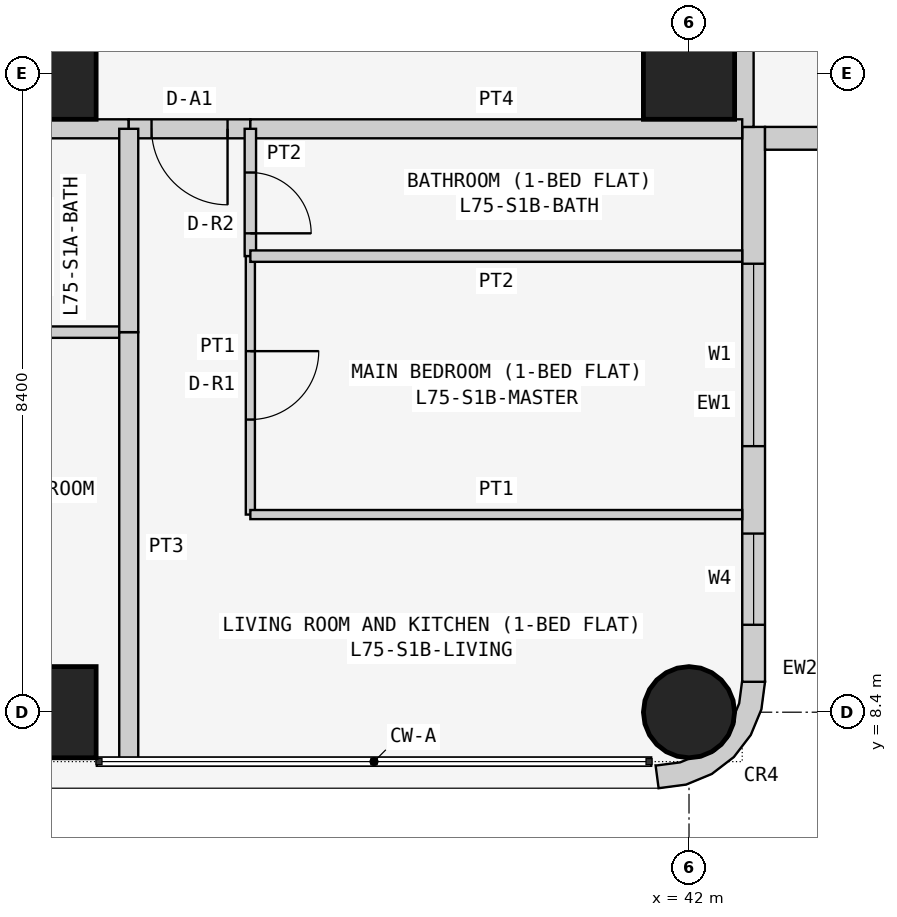
"""IFC4 building model, lengths in metres.
Left out: names, types, materials, properties, quantities, classifications, styles, units other than length and angle.
Written with IfcOpenShell. Run it as: python <this file> out.ifc"""

import sys

from ifc_helpers import new_model, si_unit, direction, frame, frame_2d, origin, origin_2d, place, context, subcontext, project, spatial, polyline, rectangle, circle, outline, extrude, element, fill, save


model = new_model("IFC4")
c1 = context("Model", 3, precision=1e-05, world=origin(), true_north=direction((0.0, 1.0)))
c2 = subcontext(c1, "Body", "Model", "MODEL_VIEW")
j1 = project(units=[si_unit("LENGTHUNIT", "METRE"), si_unit("PLANEANGLEUNIT", "RADIAN")], contexts=[c1])
p1 = place(None, origin())
s1 = spatial("IfcSite", under=j1, at=p1, CompositionType="ELEMENT")
p2 = place(p1, origin())
s2 = spatial("IfcBuilding", under=s1, at=p2, CompositionType="ELEMENT")
p3 = place(p2, frame((0.0, 0.0, 286.5)))
s3 = spatial("IfcBuildingStorey", under=s2, at=p3, CompositionType="ELEMENT", Elevation=286.5)
for number, where, z_axis, x_axis in (
    (1, (33.6, 8.4, 0.0), (0.0, 0.0, 1.0), (1.0, 0.0, 0.0)),
    (2, (33.6, 16.8, 0.0), (0.0, 0.0, 1.0), (1.0, 0.0, 0.0)),
):
    element("IfcColumn", number, at=place(p3, frame(where, z_axis=z_axis, x_axis=x_axis)), inside=s3, PredefinedType="COLUMN", context=c2, shape_type="SweptSolid", body=[
        extrude(rectangle(XDim=1.2, YDim=1.2, at=origin_2d()), origin(), (0.0, 0.0, 1.0), 3.6),
    ])
p4 = place(p3, frame((42.0, 8.4, 0.0), z_axis=(0.0, 0.0, 1.0), x_axis=(1.0, 0.0, 0.0)))
e3 = element("IfcColumn", 3, at=p4, inside=s3, PredefinedType="COLUMN", context=c2, shape_type="SweptSolid", body=[
    extrude(circle(Radius=0.6, at=origin_2d()), origin(), (0.0, 0.0, 1.0), 3.6),
])
p5 = place(p3, frame((42.0, 16.8, 0.0), z_axis=(0.0, 0.0, 1.0), x_axis=(1.0, 0.0, 0.0)))
e4 = element("IfcColumn", 4, at=p5, inside=s3, PredefinedType="COLUMN", context=c2, shape_type="SweptSolid", body=[
    extrude(rectangle(XDim=1.2, YDim=1.2, at=origin_2d()), origin(), (0.0, 0.0, 1.0), 3.6),
])
p6 = place(p3, frame((42.85, 8.8, 0.0), z_axis=(0.0, 0.0, 1.0), x_axis=(0.0, 1.0, 0.0)))
e5 = element("IfcWall", 5, at=p6, inside=s3, PredefinedType="SOLIDWALL", context=c2, shape_type="SweptSolid", body=[
    extrude(rectangle(XDim=7.3, YDim=0.3, at=frame_2d((3.65, 0.0))), origin(), (0.0, 0.0, 1.0), 3.45),
])
p7 = place(p6, frame((3.1, 0.0, 0.9)))
e6 = element("IfcOpeningElement", 6, at=p7, cuts=e5, PredefinedType="OPENING", context=c2, shape_type="SweptSolid", body=[
    extrude(rectangle(XDim=2.4, YDim=1.5, at=frame_2d((1.2, 0.75))), frame((0.0, 0.16, 0.0), z_axis=(0.0, -1.0, 0.0), x_axis=(1.0, 0.0, 0.0)), (0.0, 0.0, 1.0), 0.32),
])
p8 = place(p6, frame((0.75, 0.0, 0.9)))
e7 = element("IfcOpeningElement", 7, at=p8, cuts=e5, PredefinedType="OPENING", context=c2, shape_type="SweptSolid", body=[
    extrude(rectangle(XDim=1.2, YDim=1.5, at=frame_2d((0.6, 0.75))), frame((0.0, 0.16, 0.0), z_axis=(0.0, -1.0, 0.0), x_axis=(1.0, 0.0, 0.0)), (0.0, 0.0, 1.0), 0.32),
])
p9 = place(p3, frame((43.0, 15.95, 0.0), z_axis=(0.0, 0.0, 1.0), x_axis=(1.0, 0.0, 0.0)))
e8 = element("IfcWall", 8, at=p9, inside=s3, PredefinedType="SOLIDWALL", context=c2, shape_type="SweptSolid", body=[
    extrude(rectangle(XDim=7.0, YDim=0.3, at=frame_2d((3.5, 0.0))), origin(), (0.0, 0.0, 1.0), 3.45),
])
p10 = place(p9, frame((1.5, 0.0, 0.9)))
e9 = element("IfcOpeningElement", 9, at=p10, cuts=e8, PredefinedType="OPENING", context=c2, shape_type="SweptSolid", body=[
    extrude(rectangle(XDim=2.4, YDim=1.5, at=frame_2d((1.2, 0.75))), frame((0.0, 0.16, 0.0), z_axis=(0.0, -1.0, 0.0), x_axis=(1.0, 0.0, 0.0)), (0.0, 0.0, 1.0), 0.32),
])
p11 = place(p9, frame((5.05, 0.0, 0.9)))
e10 = element("IfcOpeningElement", 10, at=p11, cuts=e8, PredefinedType="OPENING", context=c2, shape_type="SweptSolid", body=[
    extrude(rectangle(XDim=1.2, YDim=1.5, at=frame_2d((0.6, 0.75))), frame((0.0, 0.16, 0.0), z_axis=(0.0, -1.0, 0.0), x_axis=(1.0, 0.0, 0.0)), (0.0, 0.0, 1.0), 0.32),
])
p12 = place(p3, frame((41.638, 7.824, 0.0), z_axis=(0.0, 0.0, 1.0), x_axis=(0.707106781187, -0.707106781187, 0.0)))
e11 = element("IfcWall", 11, at=p12, inside=s3, PredefinedType="SOLIDWALL", context=c2, shape_type="SweptSolid", body=[
    extrude(outline(polyline([(0.033, 1.469), (0.047, 1.455), (0.233, 1.212), (0.292, 1.069), (0.358, 1.003), (0.449, 0.782), (0.449, 0.543), (0.358, 0.322), (0.292, 0.257), (0.233, 0.114), (0.047, -0.129), (0.033, -0.143), (0.273, -0.327), (0.495, -0.037), (0.635, 0.301), (0.683, 0.663), (0.635, 1.025), (0.495, 1.363), (0.273, 1.653), (0.033, 1.469)])), origin(), (0.0, 0.0, 1.0), 3.45),
])
p13 = place(p3, frame((42.725, 22.971, 0.0), z_axis=(0.0, 0.0, 1.0), x_axis=(0.0, -1.0, 0.0)))
e12 = element("IfcWall", 12, at=p13, inside=s3, PredefinedType="PARTITIONING", context=c2, shape_type="SweptSolid", body=[
    extrude(rectangle(XDim=6.871, YDim=0.25, at=frame_2d((3.436, 0.0))), origin(), (0.0, 0.0, 1.0), 3.45),
])
p14 = place(p3, frame((34.629, 16.075, 0.0), z_axis=(0.0, 0.0, 1.0), x_axis=(-1.0, 0.0, 0.0)))
e13 = element("IfcWall", 13, at=p14, inside=s3, PredefinedType="PARTITIONING", context=c2, shape_type="SweptSolid", body=[
    extrude(rectangle(XDim=2.629, YDim=0.25, at=frame_2d((1.314, 0.0))), origin(), (0.0, 0.0, 1.0), 3.45),
])
p15 = place(p3, frame((36.229, 16.075, 0.0), z_axis=(0.0, 0.0, 1.0), x_axis=(-1.0, 0.0, 0.0)))
e14 = element("IfcWall", 14, at=p15, inside=s3, PredefinedType="PARTITIONING", context=c2, shape_type="SweptSolid", body=[
    extrude(rectangle(XDim=1.6, YDim=0.25, at=frame_2d((0.8, 0.0))), origin(), (0.0, 0.0, 1.0), 3.45),
])
p16 = place(p15, frame((0.3, 0.0, 0.0)))
e15 = element("IfcOpeningElement", 15, at=p16, cuts=e14, PredefinedType="OPENING", context=c2, shape_type="SweptSolid", body=[
    extrude(rectangle(XDim=1.0, YDim=2.1, at=frame_2d((0.5, 1.05))), frame((0.0, 0.135, 0.0), z_axis=(0.0, -1.0, 0.0), x_axis=(1.0, 0.0, 0.0)), (0.0, 0.0, 1.0), 0.27),
])
p17 = place(p3, frame((42.7, 16.075, 0.0), z_axis=(0.0, 0.0, 1.0), x_axis=(-1.0, 0.0, 0.0)))
e16 = element("IfcWall", 16, at=p17, inside=s3, PredefinedType="PARTITIONING", context=c2, shape_type="SweptSolid", body=[
    extrude(rectangle(XDim=6.471, YDim=0.25, at=frame_2d((3.235, 0.0))), origin(), (0.0, 0.0, 1.0), 3.45),
])
p18 = place(p3, frame((32.0, 13.4, 0.0), z_axis=(0.0, 0.0, 1.0), x_axis=(1.0, 0.0, 0.0)))
e17 = element("IfcWall", 17, at=p18, inside=s3, PredefinedType="PARTITIONING", context=c2, shape_type="SweptSolid", body=[
    extrude(rectangle(XDim=2.629, YDim=0.15, at=frame_2d((1.314, 0.0))), origin(), (0.0, 0.0, 1.0), 3.45),
])
p19 = place(p3, frame((34.629, 13.4, 0.0), z_axis=(0.0, 0.0, 1.0), x_axis=(0.0, -1.0, 0.0)))
e18 = element("IfcWall", 18, at=p19, inside=s3, PredefinedType="PARTITIONING", context=c2, shape_type="SweptSolid", body=[
    extrude(rectangle(XDim=5.65, YDim=0.25, at=frame_2d((2.825, 0.0))), origin(), (0.0, 0.0, 1.0), 3.45),
])
p20 = place(p3, frame((34.629, 13.4, 0.0), z_axis=(0.0, 0.0, 1.0), x_axis=(0.0, 1.0, 0.0)))
e19 = element("IfcWall", 19, at=p20, inside=s3, PredefinedType="PARTITIONING", context=c2, shape_type="SweptSolid", body=[
    extrude(rectangle(XDim=2.675, YDim=0.25, at=frame_2d((1.337, 0.0))), origin(), (0.0, 0.0, 1.0), 3.45),
])
p21 = place(p3, frame((36.229, 16.075, 0.0), z_axis=(0.0, 0.0, 1.0), x_axis=(0.0, -1.0, 0.0)))
e20 = element("IfcWall", 20, at=p21, inside=s3, PredefinedType="PARTITIONING", context=c2, shape_type="SweptSolid", body=[
    extrude(rectangle(XDim=1.675, YDim=0.15, at=frame_2d((0.837, 0.0))), origin(), (0.0, 0.0, 1.0), 3.45),
])
p22 = place(p21, frame((0.575, 0.0, 0.0)))
e21 = element("IfcOpeningElement", 21, at=p22, cuts=e20, PredefinedType="OPENING", context=c2, shape_type="SweptSolid", body=[
    extrude(rectangle(XDim=0.8, YDim=2.1, at=frame_2d((0.4, 1.05))), frame((0.0, 0.085, 0.0), z_axis=(0.0, -1.0, 0.0), x_axis=(1.0, 0.0, 0.0)), (0.0, 0.0, 1.0), 0.17),
])
p23 = place(p3, frame((36.229, 14.4, 0.0), z_axis=(0.0, 0.0, 1.0), x_axis=(0.0, -1.0, 0.0)))
e22 = element("IfcWall", 22, at=p23, inside=s3, PredefinedType="PARTITIONING", context=c2, shape_type="SweptSolid", body=[
    extrude(rectangle(XDim=3.4, YDim=0.12, at=frame_2d((1.7, 0.0))), origin(), (0.0, 0.0, 1.0), 3.45),
])
p24 = place(p23, frame((1.25, 0.0, 0.0)))
e23 = element("IfcOpeningElement", 23, at=p24, cuts=e22, PredefinedType="OPENING", context=c2, shape_type="SweptSolid", body=[
    extrude(rectangle(XDim=0.9, YDim=2.1, at=frame_2d((0.45, 1.05))), frame((0.0, 0.07, 0.0), z_axis=(0.0, -1.0, 0.0), x_axis=(1.0, 0.0, 0.0)), (0.0, 0.0, 1.0), 0.14),
])
p25 = place(p3, frame((36.229, 11.0, 0.0), z_axis=(0.0, 0.0, 1.0), x_axis=(1.0, 0.0, 0.0)))
e24 = element("IfcWall", 24, at=p25, inside=s3, PredefinedType="PARTITIONING", context=c2, shape_type="SweptSolid", body=[
    extrude(rectangle(XDim=6.471, YDim=0.12, at=frame_2d((3.235, 0.0))), origin(), (0.0, 0.0, 1.0), 3.45),
])
p26 = place(p3, frame((36.229, 14.4, 0.0), z_axis=(0.0, 0.0, 1.0), x_axis=(1.0, 0.0, 0.0)))
e25 = element("IfcWall", 25, at=p26, inside=s3, PredefinedType="PARTITIONING", context=c2, shape_type="SweptSolid", body=[
    extrude(rectangle(XDim=6.471, YDim=0.15, at=frame_2d((3.235, 0.0))), origin(), (0.0, 0.0, 1.0), 3.45),
])
p27 = place(p7, origin())
e26 = element("IfcWindow", 26, at=p27, inside=s3, PartitioningType="SINGLE_PANEL", PredefinedType="WINDOW", context=c2, shape_type="SweptSolid", body=[
    extrude(rectangle(XDim=2.4, YDim=1.5, at=frame_2d((1.2, 0.75))), frame((0.0, 0.03, 0.0), z_axis=(0.0, -1.0, 0.0), x_axis=(1.0, 0.0, 0.0)), (0.0, 0.0, 1.0), 0.06),
])
fill(e6, e26)
p28 = place(p8, origin())
e27 = element("IfcWindow", 27, at=p28, inside=s3, PartitioningType="SINGLE_PANEL", PredefinedType="WINDOW", context=c2, shape_type="SweptSolid", body=[
    extrude(rectangle(XDim=1.2, YDim=1.5, at=frame_2d((0.6, 0.75))), frame((0.0, 0.03, 0.0), z_axis=(0.0, -1.0, 0.0), x_axis=(1.0, 0.0, 0.0)), (0.0, 0.0, 1.0), 0.06),
])
fill(e7, e27)
p29 = place(p16, origin())
e28 = element("IfcDoor", 28, at=p29, inside=s3, OperationType="SINGLE_SWING_LEFT", PredefinedType="DOOR", context=c2, shape_type="SweptSolid", body=[
    extrude(rectangle(XDim=1.0, YDim=2.1, at=frame_2d((0.5, 1.05))), frame((0.0, 0.025, 0.0), z_axis=(0.0, -1.0, 0.0), x_axis=(1.0, 0.0, 0.0)), (0.0, 0.0, 1.0), 0.05),
])
fill(e15, e28)
p30 = place(p22, origin())
e29 = element("IfcDoor", 29, at=p30, inside=s3, OperationType="SINGLE_SWING_RIGHT", PredefinedType="DOOR", context=c2, shape_type="SweptSolid", body=[
    extrude(rectangle(XDim=0.8, YDim=2.1, at=frame_2d((0.4, 1.05))), frame((0.0, 0.025, 0.0), z_axis=(0.0, -1.0, 0.0), x_axis=(1.0, 0.0, 0.0)), (0.0, 0.0, 1.0), 0.05),
])
fill(e21, e29)
p31 = place(p24, origin())
e30 = element("IfcDoor", 30, at=p31, inside=s3, OperationType="SINGLE_SWING_LEFT", PredefinedType="DOOR", context=c2, shape_type="SweptSolid", body=[
    extrude(rectangle(XDim=0.9, YDim=2.1, at=frame_2d((0.45, 1.05))), frame((0.0, 0.025, 0.0), z_axis=(0.0, -1.0, 0.0), x_axis=(1.0, 0.0, 0.0)), (0.0, 0.0, 1.0), 0.05),
])
fill(e23, e30)
save(model, sys.argv[1])
